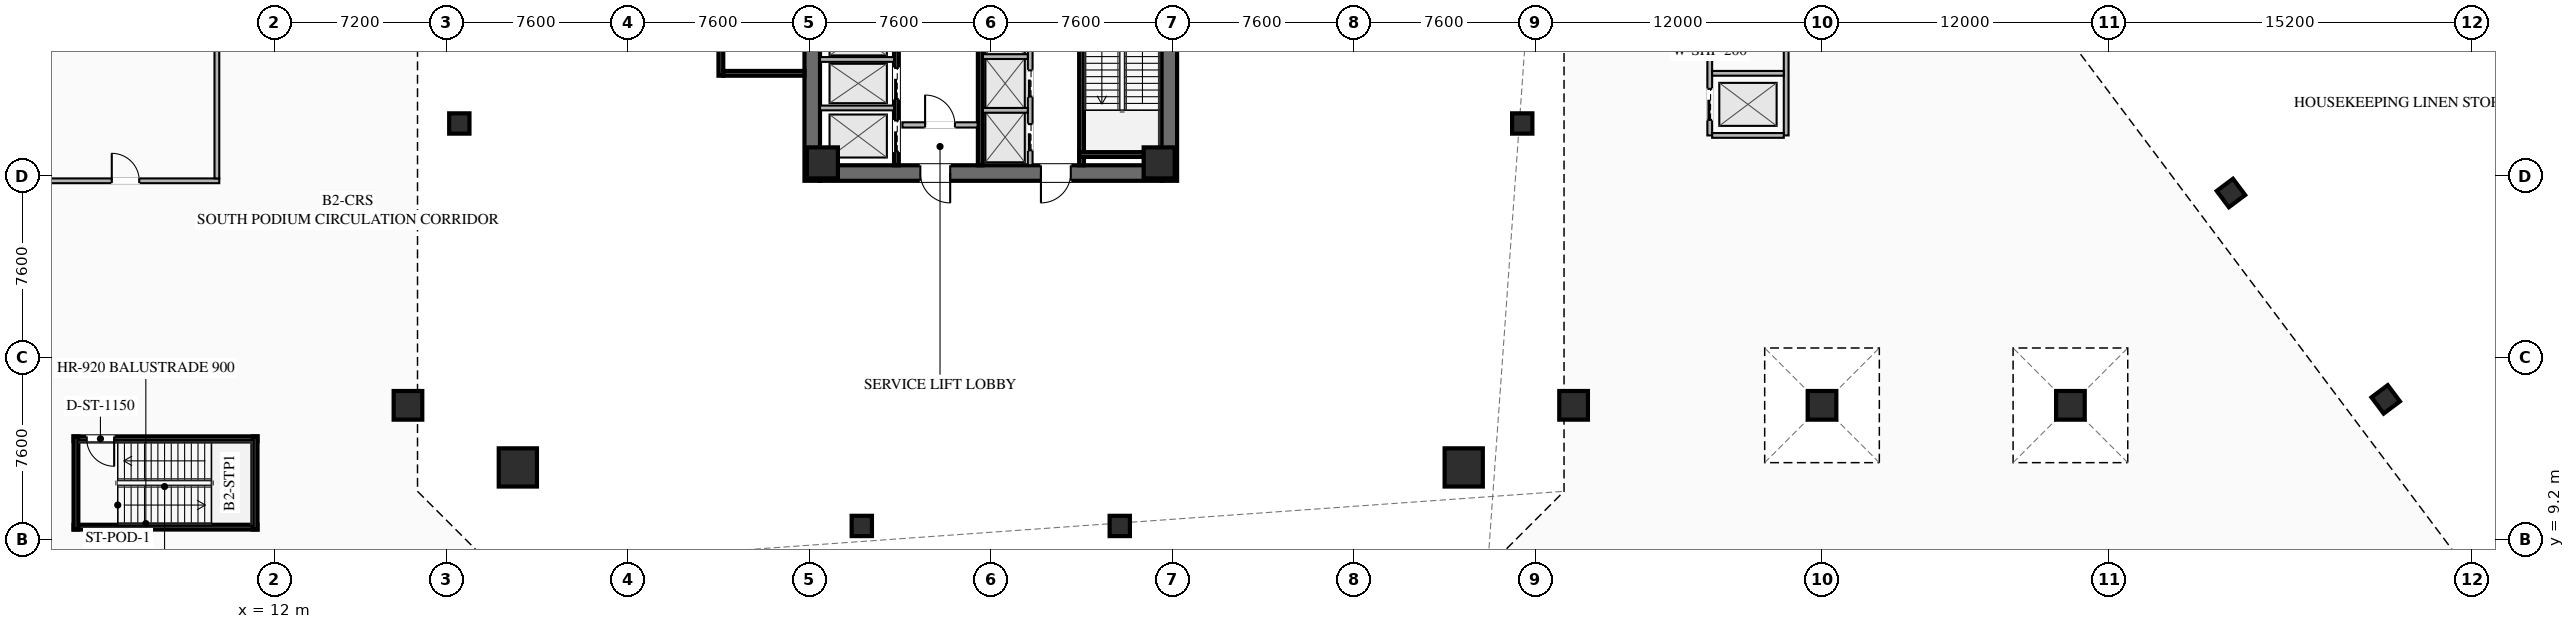
"""IFC4 building model, lengths in metres.
Left out: names, types, materials, properties, quantities, classifications, styles, units other than length and angle.
Written with IfcOpenShell. Run it as: python <this file> out.ifc"""

import sys

from ifc_helpers import new_model, si_unit, direction, frame, frame_2d, origin, origin_2d, place, context, subcontext, project, spatial, rectangle, hollow_rectangle, extrude, element, fill, save


model = new_model("IFC4")
c1 = context("Model", 3, precision=1e-05, world=origin(), true_north=direction((0.0, 1.0)))
c2 = subcontext(c1, "Body", "Model", "MODEL_VIEW")
j1 = project(units=[si_unit("LENGTHUNIT", "METRE"), si_unit("PLANEANGLEUNIT", "RADIAN")], contexts=[c1])
p1 = place(None, origin())
s1 = spatial("IfcSite", under=j1, at=p1, CompositionType="ELEMENT")
p2 = place(p1, origin())
s2 = spatial("IfcBuilding", under=s1, at=p2, CompositionType="ELEMENT")
p3 = place(p2, frame((0.0, 0.0, -11.0)))
s3 = spatial("IfcBuildingStorey", under=s2, at=p3, CompositionType="ELEMENT", Elevation=-11.0)
for number, where, z_axis, x_axis in (
    (1, (34.525, 24.2, 0.0), (0.0, 0.0, 1.0), (0.0, 1.0, 0.0)),
    (2, (49.475, 39.8, 0.0), (0.0, 0.0, 1.0), (0.0, -1.0, 0.0)),
):
    element("IfcWall", number, at=place(p3, frame(where, z_axis=z_axis, x_axis=x_axis)), inside=s3, PredefinedType="SHEAR", context=c2, shape_type="SweptSolid", body=[
        extrude(rectangle(XDim=15.6, YDim=0.65, at=frame_2d((7.8, 0.0))), origin(), (0.0, 0.0, 1.0), 5.5),
    ])
p4 = place(p3, frame((49.15, 24.525, 0.0), z_axis=(0.0, 0.0, 1.0), x_axis=(-1.0, 0.0, 0.0)))
e3 = element("IfcWall", 3, at=p4, inside=s3, PredefinedType="SHEAR", context=c2, shape_type="SweptSolid", body=[
    extrude(rectangle(XDim=14.3, YDim=0.65, at=frame_2d((7.15, 0.0))), origin(), (0.0, 0.0, 1.0), 5.5),
])
p5 = place(p4, frame((8.85, 0.0, 0.0)))
e4 = element("IfcOpeningElement", 4, at=p5, cuts=e3, PredefinedType="OPENING", context=c2, shape_type="SweptSolid", body=[
    extrude(rectangle(XDim=1.25, YDim=2.25, at=frame_2d((0.625, 1.125))), frame((0.0, 0.335, 0.0), z_axis=(0.0, -1.0, 0.0), x_axis=(1.0, 0.0, 0.0)), (0.0, 0.0, 1.0), 0.67),
])
p6 = place(p4, frame((3.8, 0.0, 0.0)))
e5 = element("IfcOpeningElement", 5, at=p6, cuts=e3, PredefinedType="OPENING", context=c2, shape_type="SweptSolid", body=[
    extrude(rectangle(XDim=1.25, YDim=2.25, at=frame_2d((0.625, 1.125))), frame((0.0, 0.335, 0.0), z_axis=(0.0, -1.0, 0.0), x_axis=(1.0, 0.0, 0.0)), (0.0, 0.0, 1.0), 0.67),
])
for number, where, z_axis, x_axis in (
    (6, (34.95, 24.95, 0.0), (0.0, 0.0, 1.0), (1.0, 0.0, 0.0)),
    (7, (49.05, 24.95, 0.0), (0.0, 0.0, 1.0), (1.0, 0.0, 0.0)),
):
    element("IfcColumn", number, at=place(p3, frame(where, z_axis=z_axis, x_axis=x_axis)), inside=s3, PredefinedType="COLUMN", context=c2, shape_type="SweptSolid", body=[
        extrude(hollow_rectangle(XDim=1.3, YDim=1.3, WallThickness=0.05, at=origin_2d()), origin(), (0.0, 0.0, 1.0), 5.24),
    ])
for number, where, z_axis, x_axis in (
    (8, (22.2, 12.2, 0.0), (0.0, 0.0, 1.0), (1.0, 0.0, 0.0)),
    (9, (61.8, 12.2, 0.0), (0.0, 0.0, 1.0), (1.0, 0.0, 0.0)),
):
    element("IfcColumn", number, at=place(p3, frame(where, z_axis=z_axis, x_axis=x_axis)), inside=s3, PredefinedType="COLUMN", context=c2, shape_type="SweptSolid", body=[
        extrude(hollow_rectangle(XDim=1.6, YDim=1.6, WallThickness=0.06, at=origin_2d()), origin(), (0.0, 0.0, 1.0), 5.24),
    ])
for number, where, z_axis, x_axis in (
    (10, (36.6, 9.75, 0.0), (0.0, 0.0, 1.0), (1.0, 0.0, 0.0)),
    (11, (47.4, 9.75, 0.0), (0.0, 0.0, 1.0), (1.0, 0.0, 0.0)),
    (12, (64.25, 26.6, 0.0), (0.0, 0.0, 1.0), (1.0, 0.0, 0.0)),
    (13, (19.75, 26.6, 0.0), (0.0, 0.0, 1.0), (1.0, 0.0, 0.0)),
):
    element("IfcColumn", number, at=place(p3, frame(where, z_axis=z_axis, x_axis=x_axis)), inside=s3, PredefinedType="COLUMN", context=c2, shape_type="SweptSolid", body=[
        extrude(hollow_rectangle(XDim=0.85, YDim=0.85, WallThickness=0.035, at=origin_2d()), origin(), (0.0, 0.0, 1.0), 5.24),
    ])
p7 = place(p3, frame((112.476, 21.107, 0.0), z_axis=(0.0, 0.0, 1.0), x_axis=(-0.600005007985, 0.799996243986, 0.0)))
e14 = element("IfcWall", 14, at=p7, inside=s3, PredefinedType="SHEAR", context=c2, shape_type="SweptSolid", body=[
    extrude(rectangle(XDim=15.6, YDim=0.65, at=frame_2d((7.8, 0.0))), origin(), (0.0, 0.0, 1.0), 5.5),
])
for number, where, z_axis, x_axis in (
    (15, (93.92, 23.69, 0.0), (0.0, 0.0, 1.0), (0.8, 0.6, 0.0)),
    (16, (100.4, 15.05, 0.0), (0.0, 0.0, 1.0), (0.8, 0.6, 0.0)),
):
    element("IfcColumn", number, at=place(p3, frame(where, z_axis=z_axis, x_axis=x_axis)), inside=s3, PredefinedType="COLUMN", context=c2, shape_type="SweptSolid", body=[
        extrude(hollow_rectangle(XDim=0.85, YDim=0.85, WallThickness=0.035, at=origin_2d()), origin(), (0.0, 0.0, 1.0), 5.24),
    ])
for number, where, z_axis, x_axis in (
    (17, (17.6, 14.8, 0.0), (0.0, 0.0, 1.0), (1.0, 0.0, 0.0)),
    (18, (66.4, 14.8, 0.0), (0.0, 0.0, 1.0), (1.0, 0.0, 0.0)),
    (19, (76.8, 14.8, 0.0), (0.0, 0.0, 1.0), (1.0, 0.0, 0.0)),
    (20, (87.2, 14.8, 0.0), (0.0, 0.0, 1.0), (1.0, 0.0, 0.0)),
):
    element("IfcColumn", number, at=place(p3, frame(where, z_axis=z_axis, x_axis=x_axis)), inside=s3, PredefinedType="COLUMN", context=c2, shape_type="SweptSolid", body=[
        extrude(rectangle(XDim=1.2, YDim=1.2, at=origin_2d()), origin(), (0.0, 0.0, 1.0), 5.24),
    ])
p8 = place(p3, frame((45.8, 32.8, 0.0), z_axis=(0.0, 0.0, 1.0), x_axis=(0.0, -1.0, 0.0)))
e21 = element("IfcWall", 21, at=p8, inside=s3, PredefinedType="SHEAR", context=c2, shape_type="SweptSolid", body=[
    extrude(rectangle(XDim=7.95, YDim=0.2, at=frame_2d((3.975, 0.0))), origin(), (0.0, 0.0, 1.0), 5.24),
])
p9 = place(p8, frame((0.45, 0.0, 0.0)))
e22 = element("IfcOpeningElement", 22, at=p9, cuts=e21, PredefinedType="OPENING", context=c2, shape_type="SweptSolid", body=[
    extrude(rectangle(XDim=1.15, YDim=2.2, at=frame_2d((0.575, 1.1))), frame((0.0, 0.11, 0.0), z_axis=(0.0, -1.0, 0.0), x_axis=(1.0, 0.0, 0.0)), (0.0, 0.0, 1.0), 0.22),
])
p10 = place(p3, frame((45.7, 25.3, 0.0), z_axis=(0.0, 0.0, 1.0), x_axis=(1.0, 0.0, 0.0)))
e23 = element("IfcWall", 23, at=p10, inside=s3, PredefinedType="SHEAR", context=c2, shape_type="SweptSolid", body=[
    extrude(rectangle(XDim=3.45, YDim=0.2, at=frame_2d((1.725, 0.0))), origin(), (0.0, 0.0, 1.0), 5.24),
])
p11 = place(p3, frame((41.56, 24.85, 0.0), z_axis=(0.0, 0.0, 1.0), x_axis=(0.0, 1.0, 0.0)))
e24 = element("IfcWall", 24, at=p11, inside=s3, PredefinedType="SHEAR", context=c2, shape_type="SweptSolid", body=[
    extrude(rectangle(XDim=14.3, YDim=0.2, at=frame_2d((7.15, 0.0))), origin(), (0.0, 0.0, 1.0), 5.24),
])
p12 = place(p3, frame((38.3, 26.54, 0.0), z_axis=(0.0, 0.0, 1.0), x_axis=(1.0, 0.0, 0.0)))
e25 = element("IfcWall", 25, at=p12, inside=s3, PredefinedType="SOLIDWALL", context=c2, shape_type="SweptSolid", body=[
    extrude(rectangle(XDim=3.15, YDim=0.22, at=frame_2d((1.575, 0.0))), origin(), (0.0, 0.0, 1.0), 4.283),
])
p13 = place(p12, frame((0.95, 0.0, 0.0)))
e26 = element("IfcOpeningElement", 26, at=p13, cuts=e25, PredefinedType="OPENING", context=c2, shape_type="SweptSolid", body=[
    extrude(rectangle(XDim=1.25, YDim=2.25, at=frame_2d((0.625, 1.125))), frame((0.0, 0.12, 0.0), z_axis=(0.0, -1.0, 0.0), x_axis=(1.0, 0.0, 0.0)), (0.0, 0.0, 1.0), 0.24),
])
p14 = place(p3, frame((38.05, 24.85, 0.0), z_axis=(0.0, 0.0, 1.0), x_axis=(0.0, 1.0, 0.0)))
e27 = element("IfcWall", 27, at=p14, inside=s3, PredefinedType="SHEAR", context=c2, shape_type="SweptSolid", body=[
    extrude(rectangle(XDim=6.35, YDim=0.2, at=frame_2d((3.175, 0.0))), origin(), (0.0, 0.0, 1.0), 5.24),
])
p15 = place(p14, frame((4.775, 0.0, 0.0)))
e28 = element("IfcOpeningElement", 28, at=p15, cuts=e27, PredefinedType="OPENING", context=c2, shape_type="SweptSolid", body=[
    extrude(rectangle(XDim=1.3, YDim=2.25, at=frame_2d((0.65, 1.125))), frame((0.0, 0.11, 0.0), z_axis=(0.0, -1.0, 0.0), x_axis=(1.0, 0.0, 0.0)), (0.0, 0.0, 1.0), 0.22),
])
p16 = place(p14, frame((2.775, 0.0, 0.0)))
e29 = element("IfcOpeningElement", 29, at=p16, cuts=e27, PredefinedType="OPENING", context=c2, shape_type="SweptSolid", body=[
    extrude(rectangle(XDim=1.3, YDim=2.25, at=frame_2d((0.65, 1.125))), frame((0.0, 0.11, 0.0), z_axis=(0.0, -1.0, 0.0), x_axis=(1.0, 0.0, 0.0)), (0.0, 0.0, 1.0), 0.22),
])
p17 = place(p14, frame((0.575, 0.0, 0.0)))
e30 = element("IfcOpeningElement", 30, at=p17, cuts=e27, PredefinedType="OPENING", context=c2, shape_type="SweptSolid", body=[
    extrude(rectangle(XDim=1.3, YDim=2.25, at=frame_2d((0.65, 1.125))), frame((0.0, 0.11, 0.0), z_axis=(0.0, -1.0, 0.0), x_axis=(1.0, 0.0, 0.0)), (0.0, 0.0, 1.0), 0.22),
])
for number, where, z_axis, x_axis in (
    (31, (34.85, 27.25, 0.0), (0.0, 0.0, 1.0), (1.0, 0.0, 0.0)),
    (32, (34.85, 29.28, 0.0), (0.0, 0.0, 1.0), (1.0, 0.0, 0.0)),
):
    element("IfcWall", number, at=place(p3, frame(where, z_axis=z_axis, x_axis=x_axis)), inside=s3, PredefinedType="SOLIDWALL", context=c2, shape_type="SweptSolid", body=[
        extrude(rectangle(XDim=3.1, YDim=0.2, at=frame_2d((1.55, 0.0))), origin(), (0.0, 0.0, 1.0), 5.24),
    ])
p18 = place(p3, frame((43.65, 24.85, 0.0), z_axis=(0.0, 0.0, 1.0), x_axis=(0.0, 1.0, 0.0)))
e33 = element("IfcWall", 33, at=p18, inside=s3, PredefinedType="SOLIDWALL", context=c2, shape_type="SweptSolid", body=[
    extrude(rectangle(XDim=6.8, YDim=0.2, at=frame_2d((3.4, 0.0))), origin(), (0.0, 0.0, 1.0), 5.24),
])
p19 = place(p18, frame((0.625, 0.0, 0.0)))
e34 = element("IfcOpeningElement", 34, at=p19, cuts=e33, PredefinedType="OPENING", context=c2, shape_type="SweptSolid", body=[
    extrude(rectangle(XDim=1.1, YDim=2.2, at=frame_2d((0.55, 1.1))), frame((0.0, 0.11, 0.0), z_axis=(0.0, -1.0, 0.0), x_axis=(1.0, 0.0, 0.0)), (0.0, 0.0, 1.0), 0.22),
])
p20 = place(p18, frame((2.875, 0.0, 0.0)))
e35 = element("IfcOpeningElement", 35, at=p20, cuts=e33, PredefinedType="OPENING", context=c2, shape_type="SweptSolid", body=[
    extrude(rectangle(XDim=1.1, YDim=2.2, at=frame_2d((0.55, 1.1))), frame((0.0, 0.11, 0.0), z_axis=(0.0, -1.0, 0.0), x_axis=(1.0, 0.0, 0.0)), (0.0, 0.0, 1.0), 0.22),
])
p21 = place(p18, frame((5.125, 0.0, 0.0)))
e36 = element("IfcOpeningElement", 36, at=p21, cuts=e33, PredefinedType="OPENING", context=c2, shape_type="SweptSolid", body=[
    extrude(rectangle(XDim=1.1, YDim=2.2, at=frame_2d((0.55, 1.1))), frame((0.0, 0.11, 0.0), z_axis=(0.0, -1.0, 0.0), x_axis=(1.0, 0.0, 0.0)), (0.0, 0.0, 1.0), 0.22),
])
for number, where, z_axis, x_axis in (
    (37, (41.67, 27.15, 0.0), (0.0, 0.0, 1.0), (1.0, 0.0, 0.0)),
    (38, (41.67, 29.4, 0.0), (0.0, 0.0, 1.0), (1.0, 0.0, 0.0)),
):
    element("IfcWall", number, at=place(p3, frame(where, z_axis=z_axis, x_axis=x_axis)), inside=s3, PredefinedType="SOLIDWALL", context=c2, shape_type="SweptSolid", body=[
        extrude(rectangle(XDim=1.88, YDim=0.2, at=frame_2d((0.94, 0.0))), origin(), (0.0, 0.0, 1.0), 5.24),
    ])
p22 = place(p3, frame((30.7, 28.6, 0.0), z_axis=(0.0, 0.0, 1.0), x_axis=(0.0, 1.0, 0.0)))
e39 = element("IfcWall", 39, at=p22, inside=s3, PredefinedType="SHEAR", context=c2, shape_type="SweptSolid", body=[
    extrude(rectangle(XDim=6.8, YDim=0.2, at=frame_2d((3.4, 0.0))), origin(), (0.0, 0.0, 1.0), 5.24),
])
p23 = place(p3, frame((30.8, 28.7, 0.0), z_axis=(0.0, 0.0, 1.0), x_axis=(1.0, 0.0, 0.0)))
e40 = element("IfcWall", 40, at=p23, inside=s3, PredefinedType="SHEAR", context=c2, shape_type="SweptSolid", body=[
    extrude(rectangle(XDim=3.4, YDim=0.2, at=frame_2d((1.7, 0.0))), origin(), (0.0, 0.0, 1.0), 5.24),
])
p24 = place(p3, frame((11.3, 13.4, 0.0), z_axis=(0.0, 0.0, 1.0), x_axis=(-1.0, 0.0, 0.0)))
e41 = element("IfcWall", 41, at=p24, inside=s3, PredefinedType="SHEAR", context=c2, shape_type="SweptSolid", body=[
    extrude(rectangle(XDim=7.7, YDim=0.2, at=frame_2d((3.85, 0.0))), origin(), (0.0, 0.0, 1.0), 5.24),
])
p25 = place(p24, frame((6.0, 0.0, 0.0)))
e42 = element("IfcOpeningElement", 42, at=p25, cuts=e41, PredefinedType="OPENING", context=c2, shape_type="SweptSolid", body=[
    extrude(rectangle(XDim=1.15, YDim=2.2, at=frame_2d((0.575, 1.1))), frame((0.0, 0.11, 0.0), z_axis=(0.0, -1.0, 0.0), x_axis=(1.0, 0.0, 0.0)), (0.0, 0.0, 1.0), 0.22),
])
p26 = place(p3, frame((3.6, 9.7, 0.0), z_axis=(0.0, 0.0, 1.0), x_axis=(1.0, 0.0, 0.0)))
e43 = element("IfcWall", 43, at=p26, inside=s3, PredefinedType="SHEAR", context=c2, shape_type="SweptSolid", body=[
    extrude(rectangle(XDim=7.7, YDim=0.2, at=frame_2d((3.85, 0.0))), origin(), (0.0, 0.0, 1.0), 5.24),
])
for number, where, z_axis, x_axis in (
    (44, (3.7, 9.6, 0.0), (0.0, 0.0, 1.0), (0.0, 1.0, 0.0)),
    (45, (11.2, 9.6, 0.0), (0.0, 0.0, 1.0), (0.0, 1.0, 0.0)),
):
    element("IfcWall", number, at=place(p3, frame(where, z_axis=z_axis, x_axis=x_axis)), inside=s3, PredefinedType="SHEAR", context=c2, shape_type="SweptSolid", body=[
        extrude(rectangle(XDim=3.9, YDim=0.2, at=frame_2d((1.95, 0.0))), origin(), (0.0, 0.0, 1.0), 5.24),
    ])
p27 = place(p3, frame((72.1, 26.1, 0.0), z_axis=(0.0, 0.0, 1.0), x_axis=(0.0, 1.0, 0.0)))
e46 = element("IfcWall", 46, at=p27, inside=s3, PredefinedType="SOLIDWALL", context=c2, shape_type="SweptSolid", body=[
    extrude(rectangle(XDim=11.8, YDim=0.2, at=frame_2d((5.9, 0.0))), origin(), (0.0, 0.0, 1.0), 4.283),
])
p28 = place(p27, frame((0.65, 0.0, 0.0)))
e47 = element("IfcOpeningElement", 47, at=p28, cuts=e46, PredefinedType="OPENING", context=c2, shape_type="SweptSolid", body=[
    extrude(rectangle(XDim=1.3, YDim=2.25, at=frame_2d((0.65, 1.125))), frame((0.0, 0.11, 0.0), z_axis=(0.0, -1.0, 0.0), x_axis=(1.0, 0.0, 0.0)), (0.0, 0.0, 1.0), 0.22),
])
p29 = place(p27, frame((9.85, 0.0, 0.0)))
e48 = element("IfcOpeningElement", 48, at=p29, cuts=e46, PredefinedType="OPENING", context=c2, shape_type="SweptSolid", body=[
    extrude(rectangle(XDim=1.3, YDim=2.25, at=frame_2d((0.65, 1.125))), frame((0.0, 0.11, 0.0), z_axis=(0.0, -1.0, 0.0), x_axis=(1.0, 0.0, 0.0)), (0.0, 0.0, 1.0), 0.22),
])
p30 = place(p3, frame((75.3, 26.1, 0.0), z_axis=(0.0, 0.0, 1.0), x_axis=(0.0, 1.0, 0.0)))
e49 = element("IfcWall", 49, at=p30, inside=s3, PredefinedType="SOLIDWALL", context=c2, shape_type="SweptSolid", body=[
    extrude(rectangle(XDim=11.8, YDim=0.2, at=frame_2d((5.9, 0.0))), origin(), (0.0, 0.0, 1.0), 4.283),
])
for number, where, z_axis, x_axis in (
    (50, (72.2, 26.1, 0.0), (0.0, 0.0, 1.0), (1.0, 0.0, 0.0)),
    (51, (72.2, 28.7, 0.0), (0.0, 0.0, 1.0), (1.0, 0.0, 0.0)),
):
    element("IfcWall", number, at=place(p3, frame(where, z_axis=z_axis, x_axis=x_axis)), inside=s3, PredefinedType="SOLIDWALL", context=c2, shape_type="SweptSolid", body=[
        extrude(rectangle(XDim=3.0, YDim=0.2, at=frame_2d((1.5, 0.0))), origin(), (0.0, 0.0, 1.0), 4.283),
    ])
p31 = place(p3, frame((0.7, 24.2, 0.0), z_axis=(0.0, 0.0, 1.0), x_axis=(1.0, 0.0, 0.0)))
e52 = element("IfcWall", 52, at=p31, inside=s3, PredefinedType="SOLIDWALL", context=c2, shape_type="SweptSolid", body=[
    extrude(rectangle(XDim=9.0, YDim=0.2, at=frame_2d((4.5, 0.0))), origin(), (0.0, 0.0, 1.0), 4.283),
])
p32 = place(p31, frame((4.5, 0.0, 0.0)))
e53 = element("IfcOpeningElement", 53, at=p32, cuts=e52, PredefinedType="OPENING", context=c2, shape_type="SweptSolid", body=[
    extrude(rectangle(XDim=1.15, YDim=2.2, at=frame_2d((0.575, 1.1))), frame((0.0, 0.11, 0.0), z_axis=(0.0, -1.0, 0.0), x_axis=(1.0, 0.0, 0.0)), (0.0, 0.0, 1.0), 0.22),
])
p33 = place(p3, frame((9.6, 24.3, 0.0), z_axis=(0.0, 0.0, 1.0), x_axis=(0.0, 1.0, 0.0)))
e54 = element("IfcWall", 54, at=p33, inside=s3, PredefinedType="SOLIDWALL", context=c2, shape_type="SweptSolid", body=[
    extrude(rectangle(XDim=15.5, YDim=0.2, at=frame_2d((7.75, 0.0))), origin(), (0.0, 0.0, 1.0), 4.283),
])
p34 = place(p5, origin())
e55 = element("IfcDoor", 55, at=p34, inside=s3, OperationType="SINGLE_SWING_LEFT", PredefinedType="DOOR", context=c2, shape_type="SweptSolid", body=[
    extrude(rectangle(XDim=1.25, YDim=2.25, at=frame_2d((0.625, 1.125))), frame((0.0, 0.025, 0.0), z_axis=(0.0, -1.0, 0.0), x_axis=(1.0, 0.0, 0.0)), (0.0, 0.0, 1.0), 0.05),
])
fill(e4, e55)
p35 = place(p6, origin())
e56 = element("IfcDoor", 56, at=p35, inside=s3, OperationType="SINGLE_SWING_RIGHT", PredefinedType="DOOR", context=c2, shape_type="SweptSolid", body=[
    extrude(rectangle(XDim=1.25, YDim=2.25, at=frame_2d((0.625, 1.125))), frame((0.0, 0.025, 0.0), z_axis=(0.0, -1.0, 0.0), x_axis=(1.0, 0.0, 0.0)), (0.0, 0.0, 1.0), 0.05),
])
fill(e5, e56)
p36 = place(p13, origin())
e57 = element("IfcDoor", 57, at=p36, inside=s3, OperationType="SINGLE_SWING_LEFT", PredefinedType="DOOR", context=c2, shape_type="SweptSolid", body=[
    extrude(rectangle(XDim=1.25, YDim=2.25, at=frame_2d((0.625, 1.125))), frame((0.0, 0.025, 0.0), z_axis=(0.0, -1.0, 0.0), x_axis=(1.0, 0.0, 0.0)), (0.0, 0.0, 1.0), 0.05),
])
fill(e26, e57)
p37 = place(p25, origin())
e58 = element("IfcDoor", 58, at=p37, inside=s3, OperationType="SINGLE_SWING_LEFT", PredefinedType="DOOR", context=c2, shape_type="SweptSolid", body=[
    extrude(rectangle(XDim=1.15, YDim=2.2, at=frame_2d((0.575, 1.1))), frame((0.0, 0.025, 0.0), z_axis=(0.0, -1.0, 0.0), x_axis=(1.0, 0.0, 0.0)), (0.0, 0.0, 1.0), 0.05),
])
fill(e42, e58)
p38 = place(p32, origin())
e59 = element("IfcDoor", 59, at=p38, inside=s3, OperationType="SINGLE_SWING_LEFT", PredefinedType="DOOR", context=c2, shape_type="SweptSolid", body=[
    extrude(rectangle(XDim=1.15, YDim=2.2, at=frame_2d((0.575, 1.1))), frame((0.0, 0.025, 0.0), z_axis=(0.0, -1.0, 0.0), x_axis=(1.0, 0.0, 0.0)), (0.0, 0.0, 1.0), 0.05),
])
fill(e53, e59)
p39 = place(p16, origin())
e60 = element("IfcDoor", 60, at=p39, inside=s3, OperationType="SLIDING_TO_LEFT", PredefinedType="DOOR", context=c2, shape_type="SweptSolid", body=[
    extrude(rectangle(XDim=1.3, YDim=2.25, at=frame_2d((0.65, 1.125))), frame((0.0, 0.025, 0.0), z_axis=(0.0, -1.0, 0.0), x_axis=(1.0, 0.0, 0.0)), (0.0, 0.0, 1.0), 0.05),
])
fill(e29, e60)
p40 = place(p17, origin())
e61 = element("IfcDoor", 61, at=p40, inside=s3, OperationType="SLIDING_TO_LEFT", PredefinedType="DOOR", context=c2, shape_type="SweptSolid", body=[
    extrude(rectangle(XDim=1.3, YDim=2.25, at=frame_2d((0.65, 1.125))), frame((0.0, 0.025, 0.0), z_axis=(0.0, -1.0, 0.0), x_axis=(1.0, 0.0, 0.0)), (0.0, 0.0, 1.0), 0.05),
])
fill(e30, e61)
p41 = place(p19, origin())
e62 = element("IfcDoor", 62, at=p41, inside=s3, OperationType="SLIDING_TO_LEFT", PredefinedType="DOOR", context=c2, shape_type="SweptSolid", body=[
    extrude(rectangle(XDim=1.1, YDim=2.2, at=frame_2d((0.55, 1.1))), frame((0.0, 0.025, 0.0), z_axis=(0.0, -1.0, 0.0), x_axis=(1.0, 0.0, 0.0)), (0.0, 0.0, 1.0), 0.05),
])
fill(e34, e62)
p42 = place(p20, origin())
e63 = element("IfcDoor", 63, at=p42, inside=s3, OperationType="SLIDING_TO_LEFT", PredefinedType="DOOR", context=c2, shape_type="SweptSolid", body=[
    extrude(rectangle(XDim=1.1, YDim=2.2, at=frame_2d((0.55, 1.1))), frame((0.0, 0.025, 0.0), z_axis=(0.0, -1.0, 0.0), x_axis=(1.0, 0.0, 0.0)), (0.0, 0.0, 1.0), 0.05),
])
fill(e35, e63)
p43 = place(p28, origin())
e64 = element("IfcDoor", 64, at=p43, inside=s3, OperationType="SLIDING_TO_LEFT", PredefinedType="DOOR", context=c2, shape_type="SweptSolid", body=[
    extrude(rectangle(XDim=1.3, YDim=2.25, at=frame_2d((0.65, 1.125))), frame((0.0, 0.025, 0.0), z_axis=(0.0, -1.0, 0.0), x_axis=(1.0, 0.0, 0.0)), (0.0, 0.0, 1.0), 0.05),
])
fill(e47, e64)
save(model, sys.argv[1])
